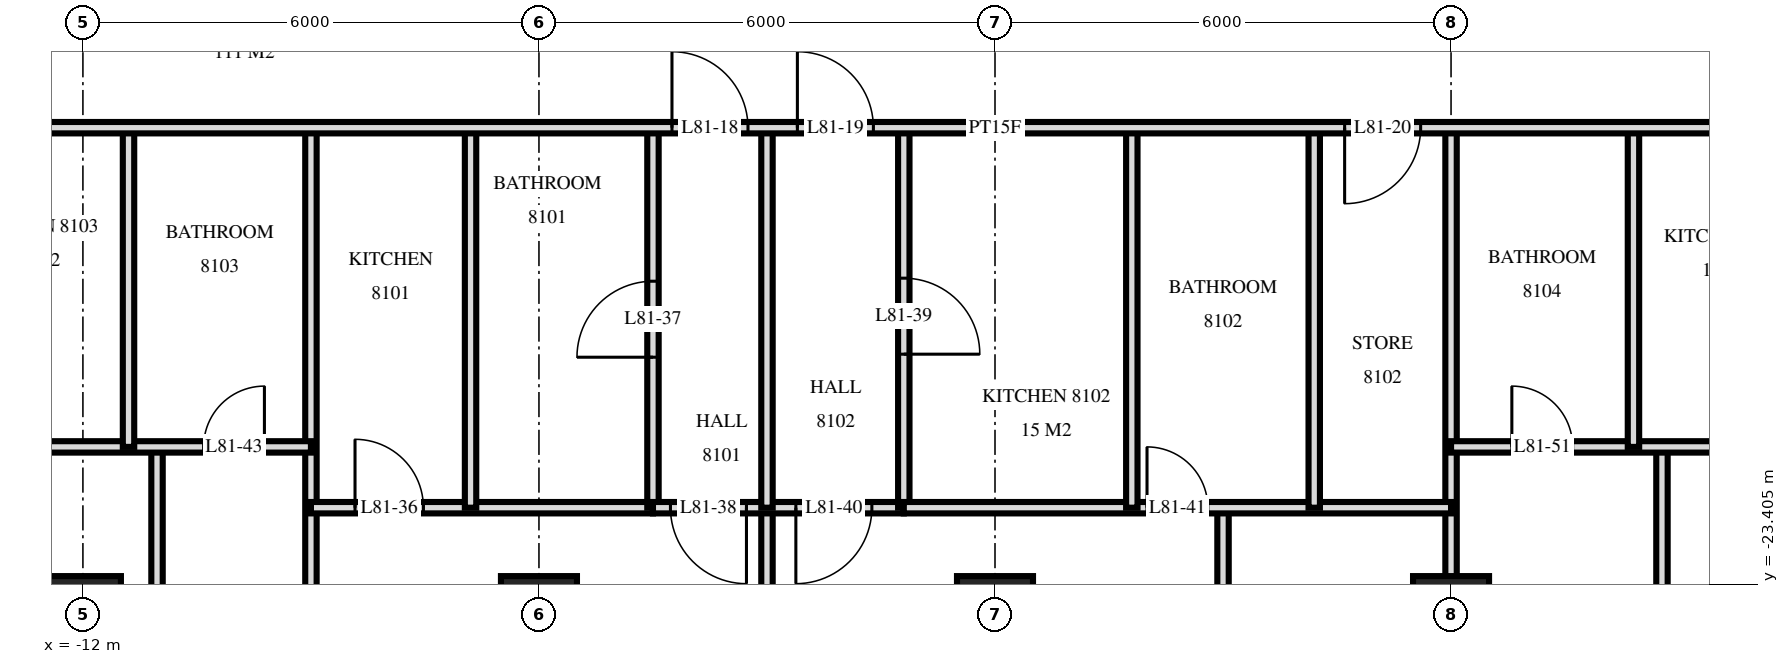
"""IFC4 building model, lengths in metres.
Left out: names, types, materials, properties, quantities, classifications, styles, units other than length and angle.
Written with IfcOpenShell. Run it as: python <this file> out.ifc"""

import sys

from ifc_helpers import new_model, si_unit, direction, frame, frame_2d, origin, origin_2d, place, context, subcontext, project, spatial, rectangle, extrude, element, fill, save


model = new_model("IFC4")
c1 = context("Model", 3, precision=1e-05, world=origin(), true_north=direction((0.0, 1.0)))
c2 = subcontext(c1, "Body", "Model", "MODEL_VIEW")
j1 = project(units=[si_unit("LENGTHUNIT", "METRE"), si_unit("PLANEANGLEUNIT", "RADIAN")], contexts=[c1])
p1 = place(None, origin())
s1 = spatial("IfcSite", under=j1, at=p1, CompositionType="ELEMENT")
p2 = place(p1, origin())
s2 = spatial("IfcBuilding", under=s1, at=p2, CompositionType="ELEMENT")
p3 = place(p2, frame((0.0, 0.0, 305.1)))
s3 = spatial("IfcBuildingStorey", under=s2, at=p3, CompositionType="ELEMENT", Elevation=305.1)
for number, where, z_axis, x_axis in (
    (1, (-12.0, -23.8, 0.0), (0.0, 0.0, 1.0), (1.0, 0.0, 0.0)),
    (2, (-6.0, -23.8, 0.0), (0.0, 0.0, 1.0), (1.0, 0.0, 0.0)),
    (3, (0.0, -23.8, 0.0), (0.0, 0.0, 1.0), (1.0, 0.0, 0.0)),
    (4, (6.0, -23.8, 0.0), (0.0, 0.0, 1.0), (1.0, 0.0, 0.0)),
):
    element("IfcColumn", number, at=place(p3, frame(where, z_axis=z_axis, x_axis=x_axis)), inside=s3, PredefinedType="COLUMN", context=c2, shape_type="SweptSolid", body=[
        extrude(rectangle(XDim=1.0, YDim=1.0, at=origin_2d()), origin(), (0.0, 0.0, 1.0), 3.5),
    ])
p4 = place(p3, frame((8.775, -33.62, 0.0), z_axis=(0.0, 0.0, 1.0), x_axis=(0.0, 1.0, 0.0)))
e5 = element("IfcWall", 5, at=p4, inside=s3, PredefinedType="PARTITIONING", context=c2, shape_type="SweptSolid", body=[
    extrude(rectangle(XDim=12.02, YDim=0.15, at=frame_2d((6.01, 0.0))), origin(), (0.0, 0.0, 1.0), 3.22),
])
p5 = place(p4, frame((5.47, 0.0, 0.0)))
e6 = element("IfcOpeningElement", 6, at=p5, cuts=e5, PredefinedType="OPENING", context=c2, shape_type="SweptSolid", body=[
    extrude(rectangle(XDim=0.9, YDim=2.1, at=frame_2d((0.45, 1.05))), frame((0.0, 0.085, 0.0), z_axis=(0.0, -1.0, 0.0), x_axis=(1.0, 0.0, 0.0)), (0.0, 0.0, 1.0), 0.17),
])
p6 = place(p3, frame((8.4, -21.6, 0.0), z_axis=(0.0, 0.0, 1.0), x_axis=(0.0, 1.0, 0.0)))
e7 = element("IfcWall", 7, at=p6, inside=s3, PredefinedType="PARTITIONING", context=c2, shape_type="SweptSolid", body=[
    extrude(rectangle(XDim=4.2, YDim=0.15, at=frame_2d((2.1, 0.0))), origin(), (0.0, 0.0, 1.0), 3.22),
])
p7 = place(p3, frame((6.0, -33.62, 0.0), z_axis=(0.0, 0.0, 1.0), x_axis=(0.0, 1.0, 0.0)))
e8 = element("IfcWall", 8, at=p7, inside=s3, PredefinedType="PARTITIONING", context=c2, shape_type="SweptSolid", body=[
    extrude(rectangle(XDim=16.22, YDim=0.15, at=frame_2d((8.11, 0.0))), origin(), (0.0, 0.0, 1.0), 3.22),
])
p8 = place(p3, frame((4.2, -22.4, 0.0), z_axis=(0.0, 0.0, 1.0), x_axis=(0.0, 1.0, 0.0)))
e9 = element("IfcWall", 9, at=p8, inside=s3, PredefinedType="PARTITIONING", context=c2, shape_type="SweptSolid", body=[
    extrude(rectangle(XDim=5.0, YDim=0.15, at=frame_2d((2.5, 0.0))), origin(), (0.0, 0.0, 1.0), 3.22),
])
p9 = place(p3, frame((3.0, -33.62, 0.0), z_axis=(0.0, 0.0, 1.0), x_axis=(0.0, 1.0, 0.0)))
e10 = element("IfcWall", 10, at=p9, inside=s3, PredefinedType="PARTITIONING", context=c2, shape_type="SweptSolid", body=[
    extrude(rectangle(XDim=11.22, YDim=0.15, at=frame_2d((5.61, 0.0))), origin(), (0.0, 0.0, 1.0), 3.22),
])
p10 = place(p9, frame((5.07, 0.0, 0.0)))
e11 = element("IfcOpeningElement", 11, at=p10, cuts=e10, PredefinedType="OPENING", context=c2, shape_type="SweptSolid", body=[
    extrude(rectangle(XDim=0.9, YDim=2.1, at=frame_2d((0.45, 1.05))), frame((0.0, 0.085, 0.0), z_axis=(0.0, -1.0, 0.0), x_axis=(1.0, 0.0, 0.0)), (0.0, 0.0, 1.0), 0.17),
])
p11 = place(p3, frame((1.8, -22.4, 0.0), z_axis=(0.0, 0.0, 1.0), x_axis=(0.0, 1.0, 0.0)))
e12 = element("IfcWall", 12, at=p11, inside=s3, PredefinedType="PARTITIONING", context=c2, shape_type="SweptSolid", body=[
    extrude(rectangle(XDim=5.0, YDim=0.15, at=frame_2d((2.5, 0.0))), origin(), (0.0, 0.0, 1.0), 3.22),
])
p12 = place(p3, frame((-1.2, -22.4, 0.0), z_axis=(0.0, 0.0, 1.0), x_axis=(0.0, 1.0, 0.0)))
e13 = element("IfcWall", 13, at=p12, inside=s3, PredefinedType="PARTITIONING", context=c2, shape_type="SweptSolid", body=[
    extrude(rectangle(XDim=5.0, YDim=0.15, at=frame_2d((2.5, 0.0))), origin(), (0.0, 0.0, 1.0), 3.22),
])
p13 = place(p12, frame((2.02, 0.0, 0.0)))
e14 = element("IfcOpeningElement", 14, at=p13, cuts=e13, PredefinedType="OPENING", context=c2, shape_type="SweptSolid", body=[
    extrude(rectangle(XDim=1.0, YDim=2.1, at=frame_2d((0.5, 1.05))), frame((0.0, 0.085, 0.0), z_axis=(0.0, -1.0, 0.0), x_axis=(1.0, 0.0, 0.0)), (0.0, 0.0, 1.0), 0.17),
])
p14 = place(p3, frame((-3.0, -22.4, 0.0), z_axis=(0.0, 0.0, 1.0), x_axis=(0.0, 1.0, 0.0)))
e15 = element("IfcWall", 15, at=p14, inside=s3, PredefinedType="PARTITIONING", context=c2, shape_type="SweptSolid", body=[
    extrude(rectangle(XDim=5.0, YDim=0.15, at=frame_2d((2.5, 0.0))), origin(), (0.0, 0.0, 1.0), 3.22),
])
p15 = place(p3, frame((-3.0, -33.62, 0.0), z_axis=(0.0, 0.0, 1.0), x_axis=(0.0, 1.0, 0.0)))
e16 = element("IfcWall", 16, at=p15, inside=s3, PredefinedType="PARTITIONING", context=c2, shape_type="SweptSolid", body=[
    extrude(rectangle(XDim=11.22, YDim=0.15, at=frame_2d((5.61, 0.0))), origin(), (0.0, 0.0, 1.0), 3.22),
])
p16 = place(p3, frame((-4.5, -22.4, 0.0), z_axis=(0.0, 0.0, 1.0), x_axis=(0.0, 1.0, 0.0)))
e17 = element("IfcWall", 17, at=p16, inside=s3, PredefinedType="PARTITIONING", context=c2, shape_type="SweptSolid", body=[
    extrude(rectangle(XDim=5.0, YDim=0.15, at=frame_2d((2.5, 0.0))), origin(), (0.0, 0.0, 1.0), 3.22),
])
p17 = place(p16, frame((1.98, 0.0, 0.0)))
e18 = element("IfcOpeningElement", 18, at=p17, cuts=e17, PredefinedType="OPENING", context=c2, shape_type="SweptSolid", body=[
    extrude(rectangle(XDim=1.0, YDim=2.1, at=frame_2d((0.5, 1.05))), frame((0.0, 0.085, 0.0), z_axis=(0.0, -1.0, 0.0), x_axis=(1.0, 0.0, 0.0)), (0.0, 0.0, 1.0), 0.17),
])
p18 = place(p3, frame((-6.9, -22.4, 0.0), z_axis=(0.0, 0.0, 1.0), x_axis=(0.0, 1.0, 0.0)))
e19 = element("IfcWall", 19, at=p18, inside=s3, PredefinedType="PARTITIONING", context=c2, shape_type="SweptSolid", body=[
    extrude(rectangle(XDim=5.0, YDim=0.15, at=frame_2d((2.5, 0.0))), origin(), (0.0, 0.0, 1.0), 3.22),
])
p19 = place(p3, frame((-9.0, -33.62, 0.0), z_axis=(0.0, 0.0, 1.0), x_axis=(0.0, 1.0, 0.0)))
e20 = element("IfcWall", 20, at=p19, inside=s3, PredefinedType="PARTITIONING", context=c2, shape_type="SweptSolid", body=[
    extrude(rectangle(XDim=16.22, YDim=0.15, at=frame_2d((8.11, 0.0))), origin(), (0.0, 0.0, 1.0), 3.22),
])
p20 = place(p3, frame((-11.025, -33.62, 0.0), z_axis=(0.0, 0.0, 1.0), x_axis=(0.0, 1.0, 0.0)))
e21 = element("IfcWall", 21, at=p20, inside=s3, PredefinedType="PARTITIONING", context=c2, shape_type="SweptSolid", body=[
    extrude(rectangle(XDim=12.02, YDim=0.15, at=frame_2d((6.01, 0.0))), origin(), (0.0, 0.0, 1.0), 3.22),
])
p21 = place(p20, frame((5.45, 0.0, 0.0)))
e22 = element("IfcOpeningElement", 22, at=p21, cuts=e21, PredefinedType="OPENING", context=c2, shape_type="SweptSolid", body=[
    extrude(rectangle(XDim=0.9, YDim=2.1, at=frame_2d((0.45, 1.05))), frame((0.0, 0.085, 0.0), z_axis=(0.0, -1.0, 0.0), x_axis=(1.0, 0.0, 0.0)), (0.0, 0.0, 1.0), 0.17),
])
p22 = place(p3, frame((-11.4, -21.6, 0.0), z_axis=(0.0, 0.0, 1.0), x_axis=(0.0, 1.0, 0.0)))
e23 = element("IfcWall", 23, at=p22, inside=s3, PredefinedType="PARTITIONING", context=c2, shape_type="SweptSolid", body=[
    extrude(rectangle(XDim=4.2, YDim=0.15, at=frame_2d((2.1, 0.0))), origin(), (0.0, 0.0, 1.0), 3.22),
])
p23 = place(p3, frame((-4.5, -22.4, 0.0), z_axis=(0.0, 0.0, 1.0), x_axis=(1.0, 0.0, 0.0)))
e24 = element("IfcWall", 24, at=p23, inside=s3, PredefinedType="PARTITIONING", context=c2, shape_type="SweptSolid", body=[
    extrude(rectangle(XDim=3.3, YDim=0.15, at=frame_2d((1.65, 0.0))), origin(), (0.0, 0.0, 1.0), 3.22),
])
p24 = place(p23, frame((0.23, 0.0, 0.0)))
e25 = element("IfcOpeningElement", 25, at=p24, cuts=e24, PredefinedType="OPENING", context=c2, shape_type="SweptSolid", body=[
    extrude(rectangle(XDim=1.0, YDim=2.1, at=frame_2d((0.5, 1.05))), frame((0.0, 0.085, 0.0), z_axis=(0.0, -1.0, 0.0), x_axis=(1.0, 0.0, 0.0)), (0.0, 0.0, 1.0), 0.17),
])
p25 = place(p23, frame((1.88, 0.0, 0.0)))
e26 = element("IfcOpeningElement", 26, at=p25, cuts=e24, PredefinedType="OPENING", context=c2, shape_type="SweptSolid", body=[
    extrude(rectangle(XDim=1.0, YDim=2.1, at=frame_2d((0.5, 1.05))), frame((0.0, 0.085, 0.0), z_axis=(0.0, -1.0, 0.0), x_axis=(1.0, 0.0, 0.0)), (0.0, 0.0, 1.0), 0.17),
])
p26 = place(p3, frame((-9.0, -22.4, 0.0), z_axis=(0.0, 0.0, 1.0), x_axis=(1.0, 0.0, 0.0)))
e27 = element("IfcWall", 27, at=p26, inside=s3, PredefinedType="PARTITIONING", context=c2, shape_type="SweptSolid", body=[
    extrude(rectangle(XDim=4.5, YDim=0.15, at=frame_2d((2.25, 0.0))), origin(), (0.0, 0.0, 1.0), 3.22),
])
p27 = place(p26, frame((0.58, 0.0, 0.0)))
e28 = element("IfcOpeningElement", 28, at=p27, cuts=e27, PredefinedType="OPENING", context=c2, shape_type="SweptSolid", body=[
    extrude(rectangle(XDim=0.9, YDim=2.1, at=frame_2d((0.45, 1.05))), frame((0.0, 0.085, 0.0), z_axis=(0.0, -1.0, 0.0), x_axis=(1.0, 0.0, 0.0)), (0.0, 0.0, 1.0), 0.17),
])
p28 = place(p3, frame((-1.2, -22.4, 0.0), z_axis=(0.0, 0.0, 1.0), x_axis=(1.0, 0.0, 0.0)))
e29 = element("IfcWall", 29, at=p28, inside=s3, PredefinedType="PARTITIONING", context=c2, shape_type="SweptSolid", body=[
    extrude(rectangle(XDim=7.2, YDim=0.15, at=frame_2d((3.6, 0.0))), origin(), (0.0, 0.0, 1.0), 3.22),
])
p29 = place(p28, frame((3.2, 0.0, 0.0)))
e30 = element("IfcOpeningElement", 30, at=p29, cuts=e29, PredefinedType="OPENING", context=c2, shape_type="SweptSolid", body=[
    extrude(rectangle(XDim=0.8, YDim=2.1, at=frame_2d((0.4, 1.05))), frame((0.0, 0.085, 0.0), z_axis=(0.0, -1.0, 0.0), x_axis=(1.0, 0.0, 0.0)), (0.0, 0.0, 1.0), 0.17),
])
p30 = place(p3, frame((-15.0, -21.6, 0.0), z_axis=(0.0, 0.0, 1.0), x_axis=(1.0, 0.0, 0.0)))
e31 = element("IfcWall", 31, at=p30, inside=s3, PredefinedType="PARTITIONING", context=c2, shape_type="SweptSolid", body=[
    extrude(rectangle(XDim=6.0, YDim=0.15, at=frame_2d((3.0, 0.0))), origin(), (0.0, 0.0, 1.0), 3.22),
])
p31 = place(p30, frame((4.588, 0.0, 0.0)))
e32 = element("IfcOpeningElement", 32, at=p31, cuts=e31, PredefinedType="OPENING", context=c2, shape_type="SweptSolid", body=[
    extrude(rectangle(XDim=0.8, YDim=2.1, at=frame_2d((0.4, 1.05))), frame((0.0, 0.085, 0.0), z_axis=(0.0, -1.0, 0.0), x_axis=(1.0, 0.0, 0.0)), (0.0, 0.0, 1.0), 0.17),
])
p32 = place(p3, frame((6.0, -21.6, 0.0), z_axis=(0.0, 0.0, 1.0), x_axis=(1.0, 0.0, 0.0)))
e33 = element("IfcWall", 33, at=p32, inside=s3, PredefinedType="PARTITIONING", context=c2, shape_type="SweptSolid", body=[
    extrude(rectangle(XDim=6.0, YDim=0.15, at=frame_2d((3.0, 0.0))), origin(), (0.0, 0.0, 1.0), 3.22),
])
p33 = place(p32, frame((0.8, 0.0, 0.0)))
e34 = element("IfcOpeningElement", 34, at=p33, cuts=e33, PredefinedType="OPENING", context=c2, shape_type="SweptSolid", body=[
    extrude(rectangle(XDim=0.8, YDim=2.1, at=frame_2d((0.4, 1.05))), frame((0.0, 0.085, 0.0), z_axis=(0.0, -1.0, 0.0), x_axis=(1.0, 0.0, 0.0)), (0.0, 0.0, 1.0), 0.17),
])
p34 = place(p3, frame((-22.92, -17.4, 0.0), z_axis=(0.0, 0.0, 1.0), x_axis=(1.0, 0.0, 0.0)))
e35 = element("IfcWall", 35, at=p34, inside=s3, PredefinedType="PARTITIONING", context=c2, shape_type="SweptSolid", body=[
    extrude(rectangle(XDim=45.84, YDim=0.15, at=frame_2d((22.92, 0.0))), origin(), (0.0, 0.0, 1.0), 3.22),
])
p35 = place(p34, frame((18.67, 0.0, 0.0)))
e36 = element("IfcOpeningElement", 36, at=p35, cuts=e35, PredefinedType="OPENING", context=c2, shape_type="SweptSolid", body=[
    extrude(rectangle(XDim=1.0, YDim=2.1, at=frame_2d((0.5, 1.05))), frame((0.0, 0.085, 0.0), z_axis=(0.0, -1.0, 0.0), x_axis=(1.0, 0.0, 0.0)), (0.0, 0.0, 1.0), 0.17),
])
p36 = place(p34, frame((20.32, 0.0, 0.0)))
e37 = element("IfcOpeningElement", 37, at=p36, cuts=e35, PredefinedType="OPENING", context=c2, shape_type="SweptSolid", body=[
    extrude(rectangle(XDim=1.0, YDim=2.1, at=frame_2d((0.5, 1.05))), frame((0.0, 0.085, 0.0), z_axis=(0.0, -1.0, 0.0), x_axis=(1.0, 0.0, 0.0)), (0.0, 0.0, 1.0), 0.17),
])
p37 = place(p34, frame((27.52, 0.0, 0.0)))
e38 = element("IfcOpeningElement", 38, at=p37, cuts=e35, PredefinedType="OPENING", context=c2, shape_type="SweptSolid", body=[
    extrude(rectangle(XDim=1.0, YDim=2.1, at=frame_2d((0.5, 1.05))), frame((0.0, 0.085, 0.0), z_axis=(0.0, -1.0, 0.0), x_axis=(1.0, 0.0, 0.0)), (0.0, 0.0, 1.0), 0.17),
])
p38 = place(p34, frame((6.42, 0.0, 0.0)))
e39 = element("IfcOpeningElement", 39, at=p38, cuts=e35, PredefinedType="OPENING", context=c2, shape_type="SweptSolid", body=[
    extrude(rectangle(XDim=1.0, YDim=2.1, at=frame_2d((0.5, 1.05))), frame((0.0, 0.085, 0.0), z_axis=(0.0, -1.0, 0.0), x_axis=(1.0, 0.0, 0.0)), (0.0, 0.0, 1.0), 0.17),
])
p39 = place(p34, frame((1.17, 0.0, 0.0)))
e40 = element("IfcOpeningElement", 40, at=p39, cuts=e35, PredefinedType="OPENING", context=c2, shape_type="SweptSolid", body=[
    extrude(rectangle(XDim=1.0, YDim=2.1, at=frame_2d((0.5, 1.05))), frame((0.0, 0.085, 0.0), z_axis=(0.0, -1.0, 0.0), x_axis=(1.0, 0.0, 0.0)), (0.0, 0.0, 1.0), 0.17),
])
p40 = place(p34, frame((35.42, 0.0, 0.0)))
e41 = element("IfcOpeningElement", 41, at=p40, cuts=e35, PredefinedType="OPENING", context=c2, shape_type="SweptSolid", body=[
    extrude(rectangle(XDim=1.0, YDim=2.1, at=frame_2d((0.5, 1.05))), frame((0.0, 0.085, 0.0), z_axis=(0.0, -1.0, 0.0), x_axis=(1.0, 0.0, 0.0)), (0.0, 0.0, 1.0), 0.17),
])
p41 = place(p34, frame((42.17, 0.0, 0.0)))
e42 = element("IfcOpeningElement", 42, at=p41, cuts=e35, PredefinedType="OPENING", context=c2, shape_type="SweptSolid", body=[
    extrude(rectangle(XDim=1.0, YDim=2.1, at=frame_2d((0.5, 1.05))), frame((0.0, 0.085, 0.0), z_axis=(0.0, -1.0, 0.0), x_axis=(1.0, 0.0, 0.0)), (0.0, 0.0, 1.0), 0.17),
])
p42 = place(p35, origin())
e43 = element("IfcDoor", 43, at=p42, inside=s3, OperationType="SINGLE_SWING_RIGHT", PredefinedType="DOOR", context=c2, shape_type="SweptSolid", body=[
    extrude(rectangle(XDim=1.0, YDim=2.1, at=frame_2d((0.5, 1.05))), frame((0.0, 0.025, 0.0), z_axis=(0.0, -1.0, 0.0), x_axis=(1.0, 0.0, 0.0)), (0.0, 0.0, 1.0), 0.05),
])
fill(e36, e43)
p43 = place(p36, origin())
e44 = element("IfcDoor", 44, at=p43, inside=s3, OperationType="SINGLE_SWING_RIGHT", PredefinedType="DOOR", context=c2, shape_type="SweptSolid", body=[
    extrude(rectangle(XDim=1.0, YDim=2.1, at=frame_2d((0.5, 1.05))), frame((0.0, 0.025, 0.0), z_axis=(0.0, -1.0, 0.0), x_axis=(1.0, 0.0, 0.0)), (0.0, 0.0, 1.0), 0.05),
])
fill(e37, e44)
p44 = place(p37, frame((0.5, 0.0, 0.0), z_axis=(0.0, 0.0, 1.0), x_axis=(-1.0, 0.0, 0.0)))
e45 = element("IfcDoor", 45, at=p44, inside=s3, OperationType="SINGLE_SWING_LEFT", PredefinedType="DOOR", context=c2, shape_type="SweptSolid", body=[
    extrude(rectangle(XDim=1.0, YDim=2.1, at=frame_2d((0.0, 1.05))), frame((0.0, -0.025, 0.0), z_axis=(0.0, 1.0, 0.0), x_axis=(-1.0, 0.0, 0.0)), (0.0, 0.0, 1.0), 0.05),
])
fill(e38, e45)
p45 = place(p27, origin())
e46 = element("IfcDoor", 46, at=p45, inside=s3, OperationType="SINGLE_SWING_RIGHT", PredefinedType="DOOR", context=c2, shape_type="SweptSolid", body=[
    extrude(rectangle(XDim=0.9, YDim=2.1, at=frame_2d((0.45, 1.05))), frame((0.0, 0.025, 0.0), z_axis=(0.0, -1.0, 0.0), x_axis=(1.0, 0.0, 0.0)), (0.0, 0.0, 1.0), 0.05),
])
fill(e28, e46)
p46 = place(p17, origin())
e47 = element("IfcDoor", 47, at=p46, inside=s3, OperationType="SINGLE_SWING_RIGHT", PredefinedType="DOOR", context=c2, shape_type="SweptSolid", body=[
    extrude(rectangle(XDim=1.0, YDim=2.1, at=frame_2d((0.5, 1.05))), frame((0.0, 0.025, 0.0), z_axis=(0.0, -1.0, 0.0), x_axis=(1.0, 0.0, 0.0)), (0.0, 0.0, 1.0), 0.05),
])
fill(e18, e47)
p47 = place(p24, frame((0.5, 0.0, 0.0), z_axis=(0.0, 0.0, 1.0), x_axis=(-1.0, 0.0, 0.0)))
e48 = element("IfcDoor", 48, at=p47, inside=s3, OperationType="SINGLE_SWING_RIGHT", PredefinedType="DOOR", context=c2, shape_type="SweptSolid", body=[
    extrude(rectangle(XDim=1.0, YDim=2.1, at=frame_2d((0.0, 1.05))), frame((0.0, -0.025, 0.0), z_axis=(0.0, 1.0, 0.0), x_axis=(-1.0, 0.0, 0.0)), (0.0, 0.0, 1.0), 0.05),
])
fill(e25, e48)
p48 = place(p13, frame((0.5, 0.0, 0.0), z_axis=(0.0, 0.0, 1.0), x_axis=(-1.0, 0.0, 0.0)))
e49 = element("IfcDoor", 49, at=p48, inside=s3, OperationType="SINGLE_SWING_LEFT", PredefinedType="DOOR", context=c2, shape_type="SweptSolid", body=[
    extrude(rectangle(XDim=1.0, YDim=2.1, at=frame_2d((0.0, 1.05))), frame((0.0, -0.025, 0.0), z_axis=(0.0, 1.0, 0.0), x_axis=(-1.0, 0.0, 0.0)), (0.0, 0.0, 1.0), 0.05),
])
fill(e14, e49)
p49 = place(p25, frame((0.5, 0.0, 0.0), z_axis=(0.0, 0.0, 1.0), x_axis=(-1.0, 0.0, 0.0)))
e50 = element("IfcDoor", 50, at=p49, inside=s3, OperationType="SINGLE_SWING_LEFT", PredefinedType="DOOR", context=c2, shape_type="SweptSolid", body=[
    extrude(rectangle(XDim=1.0, YDim=2.1, at=frame_2d((0.0, 1.05))), frame((0.0, -0.025, 0.0), z_axis=(0.0, 1.0, 0.0), x_axis=(-1.0, 0.0, 0.0)), (0.0, 0.0, 1.0), 0.05),
])
fill(e26, e50)
p50 = place(p29, origin())
e51 = element("IfcDoor", 51, at=p50, inside=s3, OperationType="SINGLE_SWING_RIGHT", PredefinedType="DOOR", context=c2, shape_type="SweptSolid", body=[
    extrude(rectangle(XDim=0.8, YDim=2.1, at=frame_2d((0.4, 1.05))), frame((0.0, 0.025, 0.0), z_axis=(0.0, -1.0, 0.0), x_axis=(1.0, 0.0, 0.0)), (0.0, 0.0, 1.0), 0.05),
])
fill(e30, e51)
p51 = place(p31, origin())
e52 = element("IfcDoor", 52, at=p51, inside=s3, OperationType="SINGLE_SWING_LEFT", PredefinedType="DOOR", context=c2, shape_type="SweptSolid", body=[
    extrude(rectangle(XDim=0.8, YDim=2.1, at=frame_2d((0.4, 1.05))), frame((0.0, 0.025, 0.0), z_axis=(0.0, -1.0, 0.0), x_axis=(1.0, 0.0, 0.0)), (0.0, 0.0, 1.0), 0.05),
])
fill(e32, e52)
p52 = place(p33, origin())
e53 = element("IfcDoor", 53, at=p52, inside=s3, OperationType="SINGLE_SWING_RIGHT", PredefinedType="DOOR", context=c2, shape_type="SweptSolid", body=[
    extrude(rectangle(XDim=0.8, YDim=2.1, at=frame_2d((0.4, 1.05))), frame((0.0, 0.025, 0.0), z_axis=(0.0, -1.0, 0.0), x_axis=(1.0, 0.0, 0.0)), (0.0, 0.0, 1.0), 0.05),
])
fill(e34, e53)
save(model, sys.argv[1])
